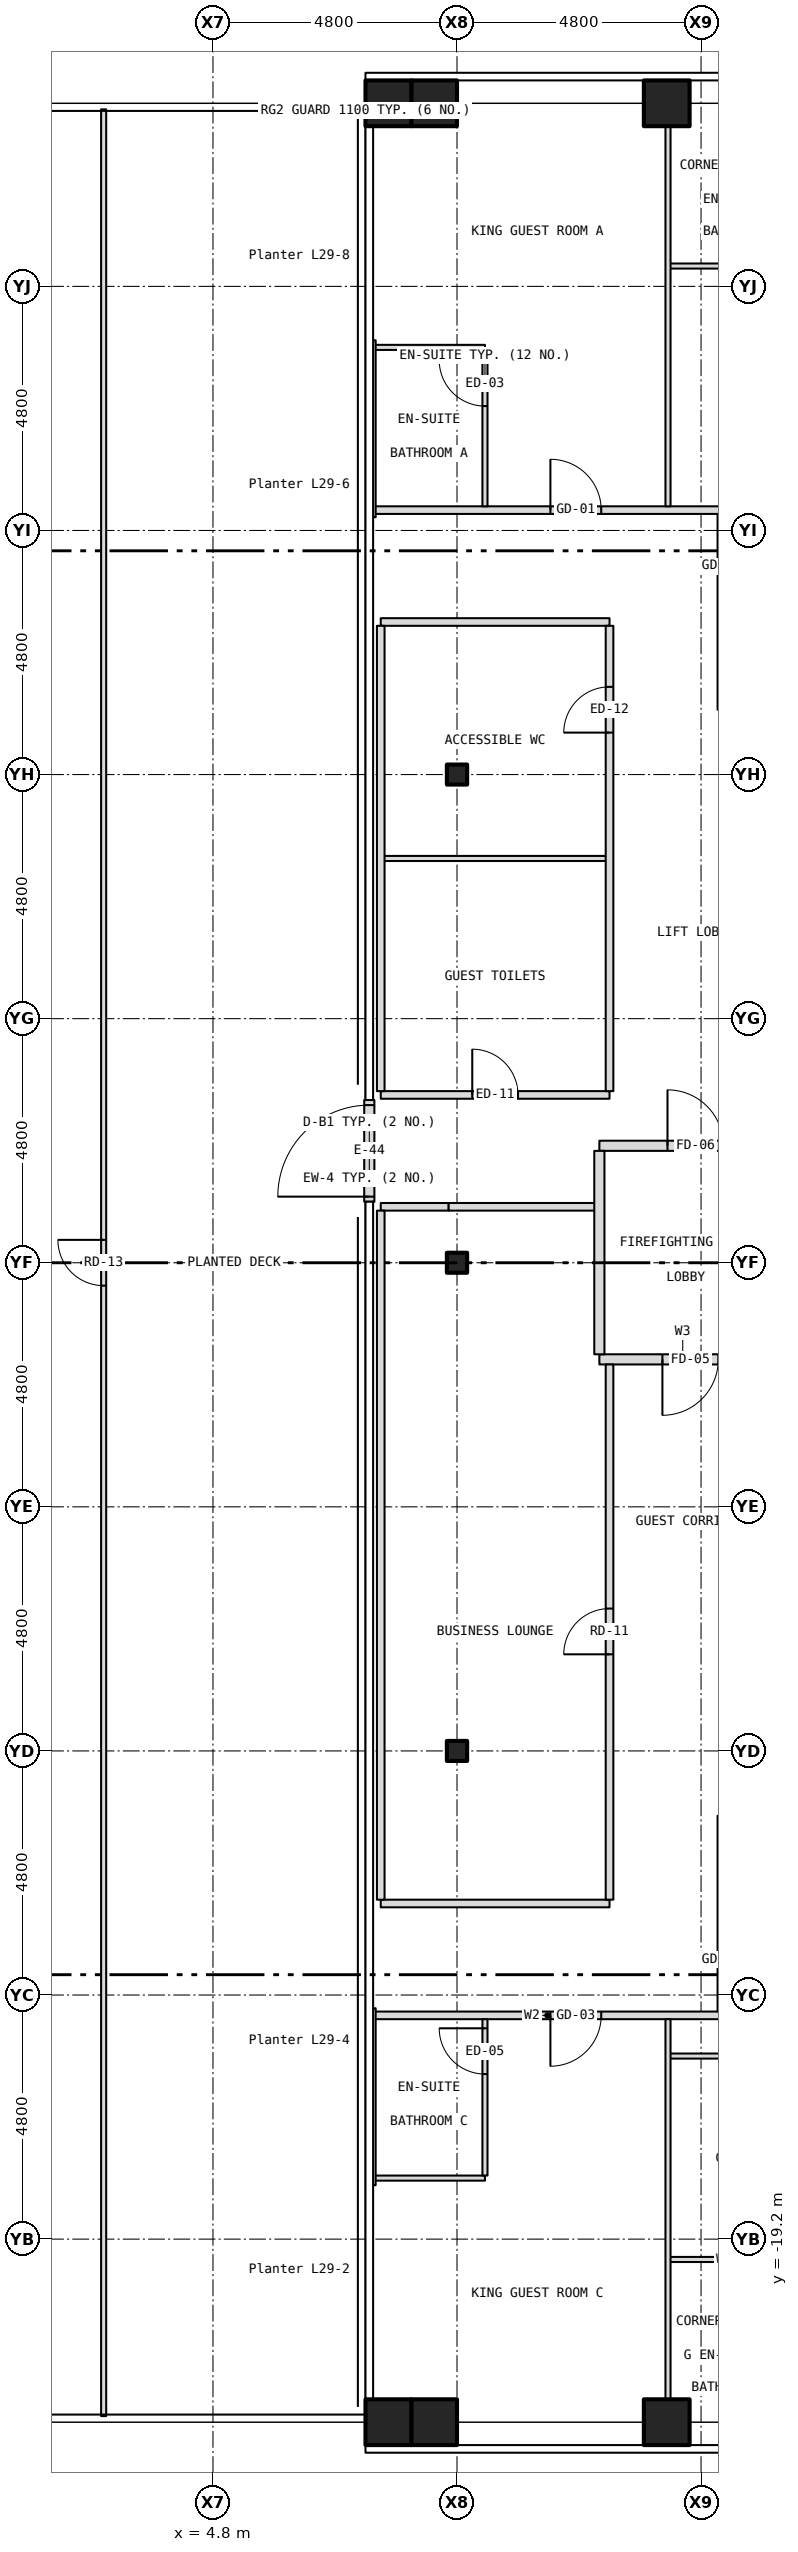
"""IFC4 building model, lengths in metres.
Left out: names, types, materials, properties, quantities, classifications, styles, units other than length and angle.
Written with IfcOpenShell. Run it as: python <this file> out.ifc"""

import sys

from ifc_helpers import new_model, si_unit, direction, frame, frame_2d, origin, origin_2d, place, context, subcontext, project, spatial, rectangle, hollow_rectangle, i_section, extrude, element, fill, save


model = new_model("IFC4")
c1 = context("Model", 3, precision=1e-05, world=origin(), true_north=direction((0.0, 1.0)))
c2 = subcontext(c1, "Body", "Model", "MODEL_VIEW")
j1 = project(units=[si_unit("LENGTHUNIT", "METRE"), si_unit("PLANEANGLEUNIT", "RADIAN")], contexts=[c1])
p1 = place(None, origin())
s1 = spatial("IfcSite", under=j1, at=p1, CompositionType="ELEMENT")
p2 = place(p1, origin())
s2 = spatial("IfcBuilding", under=s1, at=p2, CompositionType="ELEMENT")
p3 = place(p2, frame((0.0, 0.0, 117.0)))
s3 = spatial("IfcBuildingStorey", under=s2, at=p3, CompositionType="ELEMENT", Elevation=117.0)
for number, where, z_axis, x_axis in (
    (1, (9.15, 22.8, -0.15), (0.0, 0.0, 1.0), (1.0, 0.0, 0.0)),
    (2, (9.15, -22.8, -0.15), (0.0, 0.0, 1.0), (1.0, 0.0, 0.0)),
    (3, (13.725, 22.8, -0.15), (0.0, 0.0, 1.0), (1.0, 0.0, 0.0)),
    (4, (13.725, -22.8, -0.15), (0.0, 0.0, 1.0), (1.0, 0.0, 0.0)),
    (5, (8.25, 22.8, -0.15), (0.0, 0.0, 1.0), (1.0, 0.0, 0.0)),
    (6, (8.25, -22.8, -0.15), (0.0, 0.0, 1.0), (1.0, 0.0, 0.0)),
):
    element("IfcColumn", number, at=place(p3, frame(where, z_axis=z_axis, x_axis=x_axis)), inside=s3, PredefinedType="COLUMN", context=c2, shape_type="SweptSolid", body=[
        extrude(hollow_rectangle(XDim=0.9, YDim=0.9, WallThickness=0.05, at=origin_2d()), origin(), (0.0, 0.0, 1.0), 3.5),
    ])
for number, where, z_axis, x_axis in (
    (7, (9.6, -9.6, -0.15), (0.0, 0.0, 1.0), (1.0, 0.0, 0.0)),
    (8, (9.6, 0.0, -0.15), (0.0, 0.0, 1.0), (1.0, 0.0, 0.0)),
    (9, (9.6, 9.6, -0.15), (0.0, 0.0, 1.0), (1.0, 0.0, 0.0)),
):
    element("IfcColumn", number, at=place(p3, frame(where, z_axis=z_axis, x_axis=x_axis)), inside=s3, PredefinedType="COLUMN", context=c2, shape_type="SweptSolid", body=[
        extrude(i_section(OverallWidth=0.399, OverallDepth=0.394, WebThickness=0.023, FlangeThickness=0.037, at=origin_2d()), origin(), (0.0, 0.0, 1.0), 3.5),
    ])
p4 = place(p3, frame((7.875, 1.2, 0.0), z_axis=(0.0, 0.0, 1.0), x_axis=(0.0, 1.0, 0.0)))
e10 = element("IfcWall", 10, at=p4, inside=s3, PredefinedType="SOLIDWALL", context=c2, shape_type="SweptSolid", body=[
    extrude(rectangle(XDim=2.0, YDim=0.2, at=frame_2d((1.0, 0.0))), origin(), (0.0, 0.0, 1.0), 2.593),
])
p5 = place(p4, frame((0.1, 0.0, 0.0)))
e11 = element("IfcOpeningElement", 11, at=p5, cuts=e10, PredefinedType="OPENING", context=c2, shape_type="SweptSolid", body=[
    extrude(rectangle(XDim=1.8, YDim=2.1, at=frame_2d((0.9, 1.05))), frame((0.0, 0.112, 0.0), z_axis=(0.0, -1.0, 0.0), x_axis=(1.0, 0.0, 0.0)), (0.0, 0.0, 1.0), 0.224),
])
for number, where, z_axis, x_axis in (
    (12, (13.75, -19.6, 0.0), (0.0, 0.0, 1.0), (1.0, 0.0, 0.0)),
    (13, (7.95, -18.0, 0.0), (0.0, 0.0, 1.0), (1.0, 0.0, 0.0)),
):
    element("IfcWall", number, at=place(p3, frame(where, z_axis=z_axis, x_axis=x_axis)), inside=s3, PredefinedType="PARTITIONING", context=c2, shape_type="SweptSolid", body=[
        extrude(rectangle(XDim=2.2, YDim=0.1, at=frame_2d((1.1, 0.0))), origin(), (0.0, 0.0, 1.0), 3.35),
    ])
p6 = place(p3, frame((13.75, -15.6, 0.0), z_axis=(0.0, 0.0, 1.0), x_axis=(1.0, 0.0, 0.0)))
e14 = element("IfcWall", 14, at=p6, inside=s3, PredefinedType="PARTITIONING", context=c2, shape_type="SweptSolid", body=[
    extrude(rectangle(XDim=9.53, YDim=0.1, at=frame_2d((4.765, 0.0))), origin(), (0.0, 0.0, 1.0), 3.35),
])
p7 = place(p6, frame((4.062, 0.0, 0.0)))
e15 = element("IfcOpeningElement", 15, at=p7, cuts=e14, PredefinedType="OPENING", context=c2, shape_type="SweptSolid", body=[
    extrude(rectangle(XDim=0.9, YDim=2.1, at=frame_2d((0.45, 1.05))), frame((0.0, 0.062, 0.0), z_axis=(0.0, -1.0, 0.0), x_axis=(1.0, 0.0, 0.0)), (0.0, 0.0, 1.0), 0.124),
])
p8 = place(p3, frame((7.95, -14.8, 0.0), z_axis=(0.0, 0.0, 1.0), x_axis=(1.0, 0.0, 0.0)))
e16 = element("IfcWall", 16, at=p8, inside=s3, PredefinedType="PARTITIONING", context=c2, shape_type="SweptSolid", body=[
    extrude(rectangle(XDim=6.85, YDim=0.15, at=frame_2d((3.425, 0.0))), origin(), (0.0, 0.0, 1.0), 3.35),
])
p9 = place(p8, frame((3.487, 0.0, 0.0)))
e17 = element("IfcOpeningElement", 17, at=p9, cuts=e16, PredefinedType="OPENING", context=c2, shape_type="SweptSolid", body=[
    extrude(rectangle(XDim=1.0, YDim=2.1, at=frame_2d((0.5, 1.05))), frame((0.0, 0.087, 0.0), z_axis=(0.0, -1.0, 0.0), x_axis=(1.0, 0.0, 0.0)), (0.0, 0.0, 1.0), 0.174),
])
p10 = place(p3, frame((8.1, -12.6, 0.0), z_axis=(0.0, 0.0, 1.0), x_axis=(1.0, 0.0, 0.0)))
e18 = element("IfcWall", 18, at=p10, inside=s3, PredefinedType="PARTITIONING", context=c2, shape_type="SweptSolid", body=[
    extrude(rectangle(XDim=4.5, YDim=0.15, at=frame_2d((2.25, 0.0))), origin(), (0.0, 0.0, 1.0), 3.35),
])
p11 = place(p3, frame((12.4, -1.9, 0.0), z_axis=(0.0, 0.0, 1.0), x_axis=(1.0, 0.0, 0.0)))
e19 = element("IfcWall", 19, at=p11, inside=s3, PredefinedType="PARTITIONING", context=c2, shape_type="SweptSolid", body=[
    extrude(rectangle(XDim=3.28, YDim=0.2, at=frame_2d((1.64, 0.0))), origin(), (0.0, 0.0, 1.0), 3.35),
])
p12 = place(p11, frame((1.24, 0.0, 0.0)))
e20 = element("IfcOpeningElement", 20, at=p12, cuts=e19, PredefinedType="OPENING", context=c2, shape_type="SweptSolid", body=[
    extrude(rectangle(XDim=1.1, YDim=2.1, at=frame_2d((0.55, 1.05))), frame((0.0, 0.112, 0.0), z_axis=(0.0, -1.0, 0.0), x_axis=(1.0, 0.0, 0.0)), (0.0, 0.0, 1.0), 0.224),
])
p13 = place(p3, frame((8.1, 1.1, 0.0), z_axis=(0.0, 0.0, 1.0), x_axis=(1.0, 0.0, 0.0)))
e21 = element("IfcWall", 21, at=p13, inside=s3, PredefinedType="PARTITIONING", context=c2, shape_type="SweptSolid", body=[
    extrude(rectangle(XDim=1.336, YDim=0.15, at=frame_2d((0.668, 0.0))), origin(), (0.0, 0.0, 1.0), 2.593),
])
p14 = place(p3, frame((9.436, 1.1, 0.0), z_axis=(0.0, 0.0, 1.0), x_axis=(1.0, 0.0, 0.0)))
e22 = element("IfcWall", 22, at=p14, inside=s3, PredefinedType="PARTITIONING", context=c2, shape_type="SweptSolid", body=[
    extrude(rectangle(XDim=2.964, YDim=0.15, at=frame_2d((1.482, 0.0))), origin(), (0.0, 0.0, 1.0), 3.35),
])
p15 = place(p3, frame((12.4, 2.3, 0.0), z_axis=(0.0, 0.0, 1.0), x_axis=(1.0, 0.0, 0.0)))
e23 = element("IfcWall", 23, at=p15, inside=s3, PredefinedType="PARTITIONING", context=c2, shape_type="SweptSolid", body=[
    extrude(rectangle(XDim=3.28, YDim=0.2, at=frame_2d((1.64, 0.0))), origin(), (0.0, 0.0, 1.0), 3.35),
])
p16 = place(p15, frame((1.34, 0.0, 0.0)))
e24 = element("IfcOpeningElement", 24, at=p16, cuts=e23, PredefinedType="OPENING", context=c2, shape_type="SweptSolid", body=[
    extrude(rectangle(XDim=1.1, YDim=2.1, at=frame_2d((0.55, 1.05))), frame((0.0, 0.112, 0.0), z_axis=(0.0, -1.0, 0.0), x_axis=(1.0, 0.0, 0.0)), (0.0, 0.0, 1.0), 0.224),
])
p17 = place(p3, frame((8.1, 3.3, 0.0), z_axis=(0.0, 0.0, 1.0), x_axis=(1.0, 0.0, 0.0)))
e25 = element("IfcWall", 25, at=p17, inside=s3, PredefinedType="PARTITIONING", context=c2, shape_type="SweptSolid", body=[
    extrude(rectangle(XDim=4.5, YDim=0.15, at=frame_2d((2.25, 0.0))), origin(), (0.0, 0.0, 1.0), 3.35),
])
p18 = place(p17, frame((1.8, 0.0, 0.0)))
e26 = element("IfcOpeningElement", 26, at=p18, cuts=e25, PredefinedType="OPENING", context=c2, shape_type="SweptSolid", body=[
    extrude(rectangle(XDim=0.9, YDim=2.1, at=frame_2d((0.45, 1.05))), frame((0.0, 0.087, 0.0), z_axis=(0.0, -1.0, 0.0), x_axis=(1.0, 0.0, 0.0)), (0.0, 0.0, 1.0), 0.174),
])
p19 = place(p3, frame((8.1, 7.95, 0.0), z_axis=(0.0, 0.0, 1.0), x_axis=(1.0, 0.0, 0.0)))
e27 = element("IfcWall", 27, at=p19, inside=s3, PredefinedType="PARTITIONING", context=c2, shape_type="SweptSolid", body=[
    extrude(rectangle(XDim=4.5, YDim=0.1, at=frame_2d((2.25, 0.0))), origin(), (0.0, 0.0, 1.0), 3.35),
])
p20 = place(p3, frame((8.1, 12.6, 0.0), z_axis=(0.0, 0.0, 1.0), x_axis=(1.0, 0.0, 0.0)))
e28 = element("IfcWall", 28, at=p20, inside=s3, PredefinedType="PARTITIONING", context=c2, shape_type="SweptSolid", body=[
    extrude(rectangle(XDim=4.5, YDim=0.15, at=frame_2d((2.25, 0.0))), origin(), (0.0, 0.0, 1.0), 3.35),
])
p21 = place(p3, frame((7.95, 14.8, 0.0), z_axis=(0.0, 0.0, 1.0), x_axis=(1.0, 0.0, 0.0)))
e29 = element("IfcWall", 29, at=p21, inside=s3, PredefinedType="PARTITIONING", context=c2, shape_type="SweptSolid", body=[
    extrude(rectangle(XDim=6.85, YDim=0.15, at=frame_2d((3.425, 0.0))), origin(), (0.0, 0.0, 1.0), 3.35),
])
p22 = place(p21, frame((3.487, 0.0, 0.0)))
e30 = element("IfcOpeningElement", 30, at=p22, cuts=e29, PredefinedType="OPENING", context=c2, shape_type="SweptSolid", body=[
    extrude(rectangle(XDim=1.0, YDim=2.1, at=frame_2d((0.5, 1.05))), frame((0.0, 0.087, 0.0), z_axis=(0.0, -1.0, 0.0), x_axis=(1.0, 0.0, 0.0)), (0.0, 0.0, 1.0), 0.174),
])
p23 = place(p3, frame((7.95, 18.0, 0.0), z_axis=(0.0, 0.0, 1.0), x_axis=(1.0, 0.0, 0.0)))
e31 = element("IfcWall", 31, at=p23, inside=s3, PredefinedType="PARTITIONING", context=c2, shape_type="SweptSolid", body=[
    extrude(rectangle(XDim=2.2, YDim=0.1, at=frame_2d((1.1, 0.0))), origin(), (0.0, 0.0, 1.0), 3.35),
])
p24 = place(p3, frame((13.75, 19.6, 0.0), z_axis=(0.0, 0.0, 1.0), x_axis=(1.0, 0.0, 0.0)))
e32 = element("IfcWall", 32, at=p24, inside=s3, PredefinedType="PARTITIONING", context=c2, shape_type="SweptSolid", body=[
    extrude(rectangle(XDim=2.65, YDim=0.1, at=frame_2d((1.325, 0.0))), origin(), (0.0, 0.0, 1.0), 3.35),
])
p25 = place(p3, frame((2.65, -22.68, 0.0), z_axis=(0.0, 0.0, 1.0), x_axis=(0.0, 1.0, 0.0)))
e33 = element("IfcWall", 33, at=p25, inside=s3, PredefinedType="PARTITIONING", context=c2, shape_type="SweptSolid", body=[
    extrude(rectangle(XDim=45.36, YDim=0.1, at=frame_2d((22.68, 0.0))), origin(), (0.0, 0.0, 1.0), 3.35),
])
p26 = place(p25, frame((22.23, 0.0, 0.0)))
e34 = element("IfcOpeningElement", 34, at=p26, cuts=e33, PredefinedType="OPENING", context=c2, shape_type="SweptSolid", body=[
    extrude(rectangle(XDim=0.9, YDim=2.1, at=frame_2d((0.45, 1.05))), frame((0.0, 0.062, 0.0), z_axis=(0.0, -1.0, 0.0), x_axis=(1.0, 0.0, 0.0)), (0.0, 0.0, 1.0), 0.124),
])
for number, where, z_axis, x_axis in (
    (35, (7.95, -18.14, 0.0), (0.0, 0.0, 1.0), (0.0, 1.0, 0.0)),
    (36, (7.95, 14.66, 0.0), (0.0, 0.0, 1.0), (0.0, 1.0, 0.0)),
):
    element("IfcWall", number, at=place(p3, frame(where, z_axis=z_axis, x_axis=x_axis)), inside=s3, PredefinedType="PARTITIONING", context=c2, shape_type="SweptSolid", body=[
        extrude(rectangle(XDim=3.48, YDim=0.1, at=frame_2d((1.74, 0.0))), origin(), (0.0, 0.0, 1.0), 2.733),
    ])
p27 = place(p3, frame((8.1, -12.525, 0.0), z_axis=(0.0, 0.0, 1.0), x_axis=(0.0, 1.0, 0.0)))
e37 = element("IfcWall", 37, at=p27, inside=s3, PredefinedType="PARTITIONING", context=c2, shape_type="SweptSolid", body=[
    extrude(rectangle(XDim=13.55, YDim=0.15, at=frame_2d((6.775, 0.0))), origin(), (0.0, 0.0, 1.0), 3.35),
])
p28 = place(p3, frame((8.1, 3.375, 0.0), z_axis=(0.0, 0.0, 1.0), x_axis=(0.0, 1.0, 0.0)))
e38 = element("IfcWall", 38, at=p28, inside=s3, PredefinedType="PARTITIONING", context=c2, shape_type="SweptSolid", body=[
    extrude(rectangle(XDim=9.15, YDim=0.15, at=frame_2d((4.575, 0.0))), origin(), (0.0, 0.0, 1.0), 3.35),
])
p29 = place(p3, frame((10.15, -17.95, 0.0), z_axis=(0.0, 0.0, 1.0), x_axis=(0.0, 1.0, 0.0)))
e39 = element("IfcWall", 39, at=p29, inside=s3, PredefinedType="PARTITIONING", context=c2, shape_type="SweptSolid", body=[
    extrude(rectangle(XDim=3.075, YDim=0.1, at=frame_2d((1.538, 0.0))), origin(), (0.0, 0.0, 1.0), 3.35),
])
p30 = place(p29, frame((1.996, 0.0, 0.0)))
e40 = element("IfcOpeningElement", 40, at=p30, cuts=e39, PredefinedType="OPENING", context=c2, shape_type="SweptSolid", body=[
    extrude(rectangle(XDim=0.9, YDim=2.1, at=frame_2d((0.45, 1.05))), frame((0.0, 0.062, 0.0), z_axis=(0.0, -1.0, 0.0), x_axis=(1.0, 0.0, 0.0)), (0.0, 0.0, 1.0), 0.124),
])
p31 = place(p3, frame((10.15, 14.875, 0.0), z_axis=(0.0, 0.0, 1.0), x_axis=(0.0, 1.0, 0.0)))
e41 = element("IfcWall", 41, at=p31, inside=s3, PredefinedType="PARTITIONING", context=c2, shape_type="SweptSolid", body=[
    extrude(rectangle(XDim=3.075, YDim=0.1, at=frame_2d((1.538, 0.0))), origin(), (0.0, 0.0, 1.0), 3.35),
])
p32 = place(p31, frame((1.971, 0.0, 0.0)))
e42 = element("IfcOpeningElement", 42, at=p32, cuts=e41, PredefinedType="OPENING", context=c2, shape_type="SweptSolid", body=[
    extrude(rectangle(XDim=0.9, YDim=2.1, at=frame_2d((0.45, 1.05))), frame((0.0, 0.062, 0.0), z_axis=(0.0, -1.0, 0.0), x_axis=(1.0, 0.0, 0.0)), (0.0, 0.0, 1.0), 0.124),
])
p33 = place(p3, frame((12.4, -1.8, 0.0), z_axis=(0.0, 0.0, 1.0), x_axis=(0.0, 1.0, 0.0)))
e43 = element("IfcWall", 43, at=p33, inside=s3, PredefinedType="PARTITIONING", context=c2, shape_type="SweptSolid", body=[
    extrude(rectangle(XDim=4.0, YDim=0.2, at=frame_2d((2.0, 0.0))), origin(), (0.0, 0.0, 1.0), 3.35),
])
p34 = place(p3, frame((12.6, -12.525, 0.0), z_axis=(0.0, 0.0, 1.0), x_axis=(0.0, 1.0, 0.0)))
e44 = element("IfcWall", 44, at=p34, inside=s3, PredefinedType="PARTITIONING", context=c2, shape_type="SweptSolid", body=[
    extrude(rectangle(XDim=10.525, YDim=0.15, at=frame_2d((5.262, 0.0))), origin(), (0.0, 0.0, 1.0), 3.35),
])
p35 = place(p34, frame((4.825, 0.0, 0.0)))
e45 = element("IfcOpeningElement", 45, at=p35, cuts=e44, PredefinedType="OPENING", context=c2, shape_type="SweptSolid", body=[
    extrude(rectangle(XDim=0.9, YDim=2.1, at=frame_2d((0.45, 1.05))), frame((0.0, 0.087, 0.0), z_axis=(0.0, -1.0, 0.0), x_axis=(1.0, 0.0, 0.0)), (0.0, 0.0, 1.0), 0.174),
])
p36 = place(p3, frame((12.6, 3.375, 0.0), z_axis=(0.0, 0.0, 1.0), x_axis=(0.0, 1.0, 0.0)))
e46 = element("IfcWall", 46, at=p36, inside=s3, PredefinedType="PARTITIONING", context=c2, shape_type="SweptSolid", body=[
    extrude(rectangle(XDim=9.15, YDim=0.15, at=frame_2d((4.575, 0.0))), origin(), (0.0, 0.0, 1.0), 3.35),
])
p37 = place(p36, frame((7.05, 0.0, 0.0)))
e47 = element("IfcOpeningElement", 47, at=p37, cuts=e46, PredefinedType="OPENING", context=c2, shape_type="SweptSolid", body=[
    extrude(rectangle(XDim=0.9, YDim=2.1, at=frame_2d((0.45, 1.05))), frame((0.0, 0.087, 0.0), z_axis=(0.0, -1.0, 0.0), x_axis=(1.0, 0.0, 0.0)), (0.0, 0.0, 1.0), 0.174),
])
for number, where, z_axis, x_axis in (
    (48, (13.75, -22.68, 0.0), (0.0, 0.0, 1.0), (0.0, 1.0, 0.0)),
    (49, (13.75, 14.875, 0.0), (0.0, 0.0, 1.0), (0.0, 1.0, 0.0)),
):
    element("IfcWall", number, at=place(p3, frame(where, z_axis=z_axis, x_axis=x_axis)), inside=s3, PredefinedType="PARTITIONING", context=c2, shape_type="SweptSolid", body=[
        extrude(rectangle(XDim=7.805, YDim=0.1, at=frame_2d((3.902, 0.0))), origin(), (0.0, 0.0, 1.0), 3.35),
    ])
p38 = place(p5, origin())
e50 = element("IfcDoor", 50, at=p38, inside=s3, OperationType="DOUBLE_DOOR_DOUBLE_SWING", PredefinedType="DOOR", context=c2, shape_type="SweptSolid", body=[
    extrude(rectangle(XDim=1.8, YDim=2.1, at=frame_2d((0.9, 1.05))), frame((0.0, 0.025, 0.0), z_axis=(0.0, -1.0, 0.0), x_axis=(1.0, 0.0, 0.0)), (0.0, 0.0, 1.0), 0.05),
])
fill(e11, e50)
p39 = place(p12, origin())
e51 = element("IfcDoor", 51, at=p39, inside=s3, OperationType="SINGLE_SWING_LEFT", PredefinedType="DOOR", context=c2, shape_type="SweptSolid", body=[
    extrude(rectangle(XDim=1.1, YDim=2.1, at=frame_2d((0.55, 1.05))), frame((0.0, 0.025, 0.0), z_axis=(0.0, -1.0, 0.0), x_axis=(1.0, 0.0, 0.0)), (0.0, 0.0, 1.0), 0.05),
])
fill(e20, e51)
p40 = place(p16, origin())
e52 = element("IfcDoor", 52, at=p40, inside=s3, OperationType="SINGLE_SWING_LEFT", PredefinedType="DOOR", context=c2, shape_type="SweptSolid", body=[
    extrude(rectangle(XDim=1.1, YDim=2.1, at=frame_2d((0.55, 1.05))), frame((0.0, 0.025, 0.0), z_axis=(0.0, -1.0, 0.0), x_axis=(1.0, 0.0, 0.0)), (0.0, 0.0, 1.0), 0.05),
])
fill(e24, e52)
p41 = place(p22, origin())
e53 = element("IfcDoor", 53, at=p41, inside=s3, OperationType="SINGLE_SWING_LEFT", PredefinedType="DOOR", context=c2, shape_type="SweptSolid", body=[
    extrude(rectangle(XDim=1.0, YDim=2.1, at=frame_2d((0.5, 1.05))), frame((0.0, 0.025, 0.0), z_axis=(0.0, -1.0, 0.0), x_axis=(1.0, 0.0, 0.0)), (0.0, 0.0, 1.0), 0.05),
])
fill(e30, e53)
p42 = place(p32, origin())
e54 = element("IfcDoor", 54, at=p42, inside=s3, OperationType="SINGLE_SWING_RIGHT", PredefinedType="DOOR", context=c2, shape_type="SweptSolid", body=[
    extrude(rectangle(XDim=0.9, YDim=2.1, at=frame_2d((0.45, 1.05))), frame((0.0, 0.025, 0.0), z_axis=(0.0, -1.0, 0.0), x_axis=(1.0, 0.0, 0.0)), (0.0, 0.0, 1.0), 0.05),
])
fill(e42, e54)
p43 = place(p9, origin())
e55 = element("IfcDoor", 55, at=p43, inside=s3, OperationType="SINGLE_SWING_LEFT", PredefinedType="DOOR", context=c2, shape_type="SweptSolid", body=[
    extrude(rectangle(XDim=1.0, YDim=2.1, at=frame_2d((0.5, 1.05))), frame((0.0, 0.025, 0.0), z_axis=(0.0, -1.0, 0.0), x_axis=(1.0, 0.0, 0.0)), (0.0, 0.0, 1.0), 0.05),
])
fill(e17, e55)
p44 = place(p30, origin())
e56 = element("IfcDoor", 56, at=p44, inside=s3, OperationType="SINGLE_SWING_RIGHT", PredefinedType="DOOR", context=c2, shape_type="SweptSolid", body=[
    extrude(rectangle(XDim=0.9, YDim=2.1, at=frame_2d((0.45, 1.05))), frame((0.0, 0.025, 0.0), z_axis=(0.0, -1.0, 0.0), x_axis=(1.0, 0.0, 0.0)), (0.0, 0.0, 1.0), 0.05),
])
fill(e40, e56)
p45 = place(p18, origin())
e57 = element("IfcDoor", 57, at=p45, inside=s3, OperationType="SINGLE_SWING_LEFT", PredefinedType="DOOR", context=c2, shape_type="SweptSolid", body=[
    extrude(rectangle(XDim=0.9, YDim=2.1, at=frame_2d((0.45, 1.05))), frame((0.0, 0.025, 0.0), z_axis=(0.0, -1.0, 0.0), x_axis=(1.0, 0.0, 0.0)), (0.0, 0.0, 1.0), 0.05),
])
fill(e26, e57)
p46 = place(p37, origin())
e58 = element("IfcDoor", 58, at=p46, inside=s3, OperationType="SINGLE_SWING_LEFT", PredefinedType="DOOR", context=c2, shape_type="SweptSolid", body=[
    extrude(rectangle(XDim=0.9, YDim=2.1, at=frame_2d((0.45, 1.05))), frame((0.0, 0.025, 0.0), z_axis=(0.0, -1.0, 0.0), x_axis=(1.0, 0.0, 0.0)), (0.0, 0.0, 1.0), 0.05),
])
fill(e47, e58)
p47 = place(p35, origin())
e59 = element("IfcDoor", 59, at=p47, inside=s3, OperationType="SINGLE_SWING_LEFT", PredefinedType="DOOR", context=c2, shape_type="SweptSolid", body=[
    extrude(rectangle(XDim=0.9, YDim=2.1, at=frame_2d((0.45, 1.05))), frame((0.0, 0.025, 0.0), z_axis=(0.0, -1.0, 0.0), x_axis=(1.0, 0.0, 0.0)), (0.0, 0.0, 1.0), 0.05),
])
fill(e45, e59)
p48 = place(p26, origin())
e60 = element("IfcDoor", 60, at=p48, inside=s3, OperationType="SINGLE_SWING_RIGHT", PredefinedType="DOOR", context=c2, shape_type="SweptSolid", body=[
    extrude(rectangle(XDim=0.9, YDim=2.1, at=frame_2d((0.45, 1.05))), frame((0.0, 0.025, 0.0), z_axis=(0.0, -1.0, 0.0), x_axis=(1.0, 0.0, 0.0)), (0.0, 0.0, 1.0), 0.05),
])
fill(e34, e60)
save(model, sys.argv[1])
